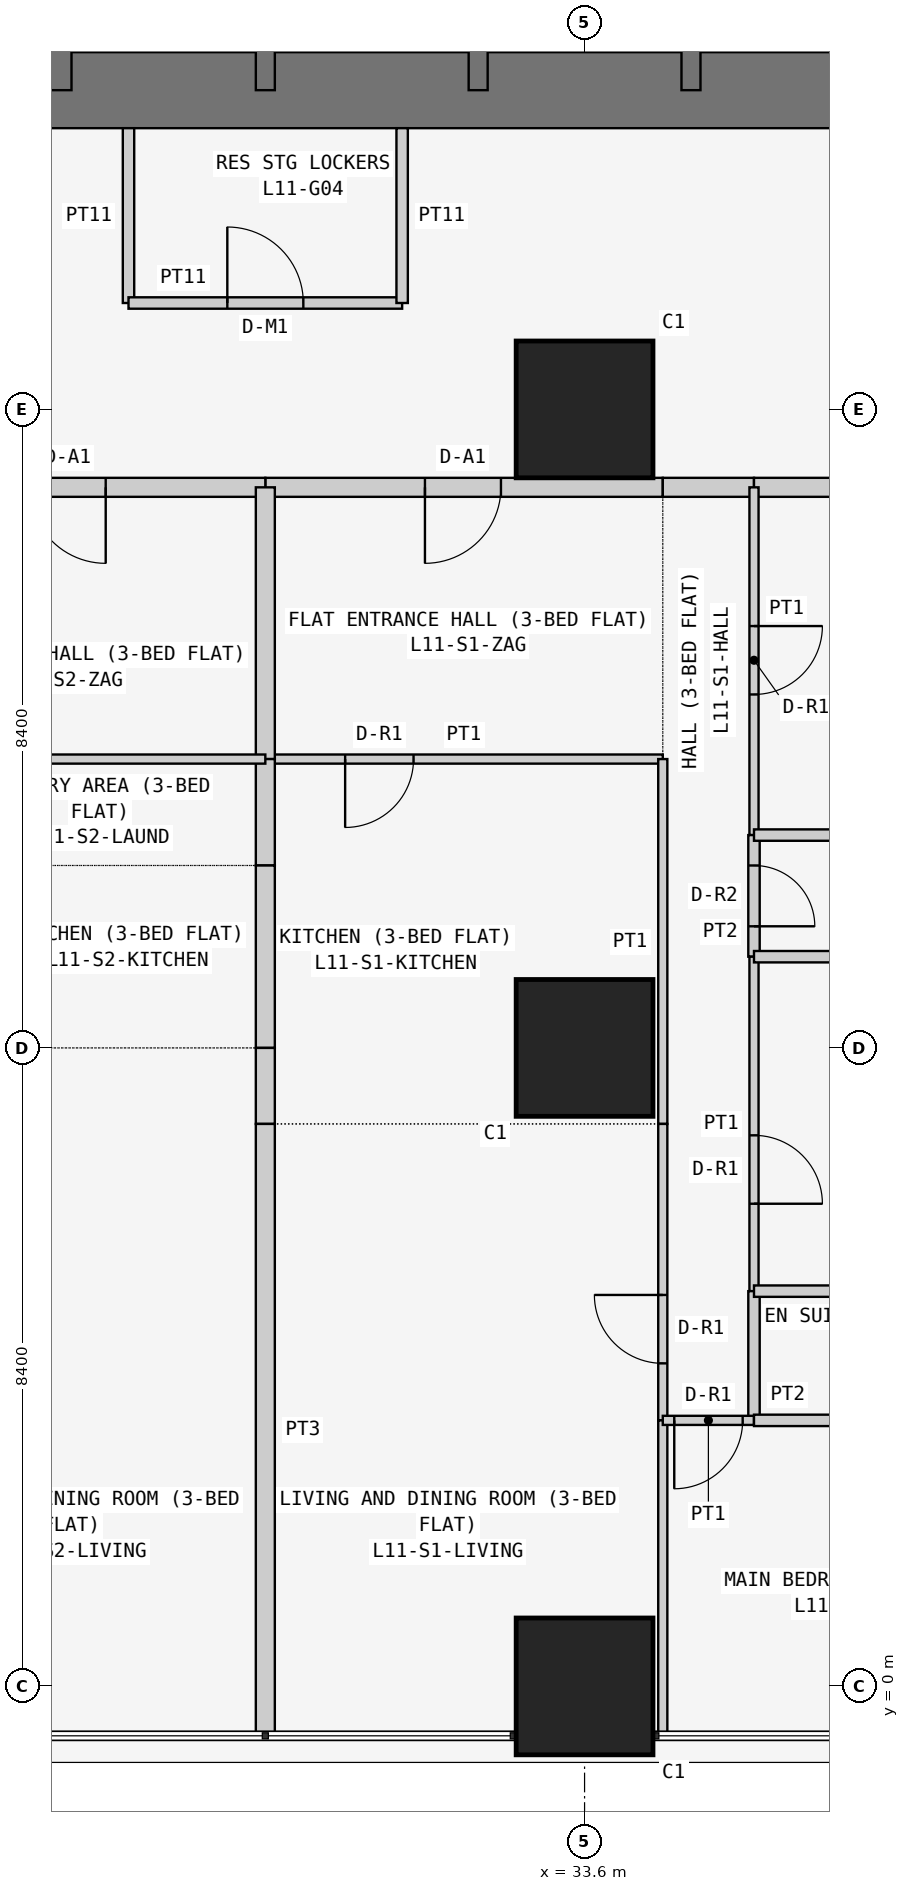
"""IFC4 building model, lengths in metres.
Left out: names, types, materials, properties, quantities, classifications, styles, units other than length and angle.
Written with IfcOpenShell. Run it as: python <this file> out.ifc"""

import sys

from ifc_helpers import new_model, si_unit, direction, frame, frame_2d, origin, origin_2d, place, context, subcontext, project, spatial, rectangle, extrude, element, fill, save


model = new_model("IFC4")
c1 = context("Model", 3, precision=1e-05, world=origin(), true_north=direction((0.0, 1.0)))
c2 = subcontext(c1, "Body", "Model", "MODEL_VIEW")
j1 = project(units=[si_unit("LENGTHUNIT", "METRE"), si_unit("PLANEANGLEUNIT", "RADIAN")], contexts=[c1])
p1 = place(None, origin())
s1 = spatial("IfcSite", under=j1, at=p1, CompositionType="ELEMENT")
p2 = place(p1, origin())
s2 = spatial("IfcBuilding", under=s1, at=p2, CompositionType="ELEMENT")
p3 = place(p2, frame((0.0, 0.0, 48.9)))
s3 = spatial("IfcBuildingStorey", under=s2, at=p3, CompositionType="ELEMENT", Elevation=48.9)
for number, where, z_axis, x_axis in (
    (1, (33.6, 0.0, 0.0), (0.0, 0.0, 1.0), (1.0, 0.0, 0.0)),
    (2, (33.6, 8.4, 0.0), (0.0, 0.0, 1.0), (1.0, 0.0, 0.0)),
    (3, (33.6, 16.8, 0.0), (0.0, 0.0, 1.0), (1.0, 0.0, 0.0)),
):
    element("IfcColumn", number, at=place(p3, frame(where, z_axis=z_axis, x_axis=x_axis)), inside=s3, PredefinedType="COLUMN", context=c2, shape_type="SweptSolid", body=[
        extrude(rectangle(XDim=1.8, YDim=1.8, at=origin_2d()), origin(), (0.0, 0.0, 1.0), 3.6),
    ])
p4 = place(p3, frame((21.0, 21.0, 0.0), z_axis=(0.0, 0.0, 1.0), x_axis=(1.0, 0.0, 0.0)))
e4 = element("IfcWall", 4, at=p4, inside=s3, PredefinedType="SHEAR", context=c2, shape_type="SweptSolid", body=[
    extrude(rectangle(XDim=17.3, YDim=1.0, at=frame_2d((8.65, 0.0))), origin(), (0.0, 0.0, 1.0), 3.6),
])
p5 = place(p3, frame((26.6, 21.0, 0.0), z_axis=(0.0, 0.0, 1.0), x_axis=(0.0, 1.0, 0.0)))
e5 = element("IfcWall", 5, at=p5, inside=s3, PredefinedType="SHEAR", context=c2, shape_type="SweptSolid", body=[
    extrude(rectangle(XDim=16.8, YDim=0.5, at=frame_2d((8.4, 0.0))), origin(), (0.0, 0.0, 1.0), 3.6),
])
p6 = place(p5, frame((10.4, 0.0, 0.0)))
e6 = element("IfcOpeningElement", 6, at=p6, cuts=e5, PredefinedType="OPENING", context=c2, shape_type="SweptSolid", body=[
    extrude(rectangle(XDim=1.2, YDim=2.1, at=frame_2d((0.6, 1.05))), frame((0.0, 0.26, 0.0), z_axis=(0.0, -1.0, 0.0), x_axis=(1.0, 0.0, 0.0)), (0.0, 0.0, 1.0), 0.52),
])
for number, where, z_axis, x_axis in (
    (7, (29.4, 21.0, 0.0), (0.0, 0.0, 1.0), (0.0, 1.0, 0.0)),
    (8, (32.2, 21.0, 0.0), (0.0, 0.0, 1.0), (0.0, 1.0, 0.0)),
    (9, (35.0, 21.0, 0.0), (0.0, 0.0, 1.0), (0.0, 1.0, 0.0)),
):
    element("IfcWall", number, at=place(p3, frame(where, z_axis=z_axis, x_axis=x_axis)), inside=s3, PredefinedType="SHEAR", context=c2, shape_type="SweptSolid", body=[
        extrude(rectangle(XDim=3.2, YDim=0.25, at=frame_2d((1.6, 0.0))), origin(), (0.0, 0.0, 1.0), 3.6),
    ])
p7 = place(p3, frame((27.6, 20.5, 0.0), z_axis=(0.0, 0.0, 1.0), x_axis=(0.0, -1.0, 0.0)))
e10 = element("IfcWall", 10, at=p7, inside=s3, PredefinedType="PARTITIONING", context=c2, shape_type="SweptSolid", body=[
    extrude(rectangle(XDim=2.3, YDim=0.15, at=frame_2d((1.15, 0.0))), origin(), (0.0, 0.0, 1.0), 3.45),
])
p8 = place(p3, frame((27.6, 18.2, 0.0), z_axis=(0.0, 0.0, 1.0), x_axis=(1.0, 0.0, 0.0)))
e11 = element("IfcWall", 11, at=p8, inside=s3, PredefinedType="PARTITIONING", context=c2, shape_type="SweptSolid", body=[
    extrude(rectangle(XDim=3.6, YDim=0.15, at=frame_2d((1.8, 0.0))), origin(), (0.0, 0.0, 1.0), 3.45),
])
p9 = place(p8, frame((1.3, 0.0, 0.0)))
e12 = element("IfcOpeningElement", 12, at=p9, cuts=e11, PredefinedType="OPENING", context=c2, shape_type="SweptSolid", body=[
    extrude(rectangle(XDim=1.0, YDim=2.1, at=frame_2d((0.5, 1.05))), frame((0.0, 0.085, 0.0), z_axis=(0.0, -1.0, 0.0), x_axis=(1.0, 0.0, 0.0)), (0.0, 0.0, 1.0), 0.17),
])
p10 = place(p3, frame((31.2, 18.2, 0.0), z_axis=(0.0, 0.0, 1.0), x_axis=(0.0, 1.0, 0.0)))
e13 = element("IfcWall", 13, at=p10, inside=s3, PredefinedType="PARTITIONING", context=c2, shape_type="SweptSolid", body=[
    extrude(rectangle(XDim=2.3, YDim=0.15, at=frame_2d((1.15, 0.0))), origin(), (0.0, 0.0, 1.0), 3.45),
])
p11 = place(p3, frame((34.629, 15.775, 0.0), z_axis=(0.0, 0.0, 1.0), x_axis=(-1.0, 0.0, 0.0)))
e14 = element("IfcWall", 14, at=p11, inside=s3, PredefinedType="PARTITIONING", context=c2, shape_type="SweptSolid", body=[
    extrude(rectangle(XDim=5.229, YDim=0.25, at=frame_2d((2.615, 0.0))), origin(), (0.0, 0.0, 1.0), 3.45),
])
p12 = place(p11, frame((2.129, 0.0, 0.0)))
e15 = element("IfcOpeningElement", 15, at=p12, cuts=e14, PredefinedType="OPENING", context=c2, shape_type="SweptSolid", body=[
    extrude(rectangle(XDim=1.0, YDim=2.1, at=frame_2d((0.5, 1.05))), frame((0.0, 0.135, 0.0), z_axis=(0.0, -1.0, 0.0), x_axis=(1.0, 0.0, 0.0)), (0.0, 0.0, 1.0), 0.27),
])
p13 = place(p3, frame((35.829, 15.775, 0.0), z_axis=(0.0, 0.0, 1.0), x_axis=(-1.0, 0.0, 0.0)))
e16 = element("IfcWall", 16, at=p13, inside=s3, PredefinedType="PARTITIONING", context=c2, shape_type="SweptSolid", body=[
    extrude(rectangle(XDim=1.2, YDim=0.25, at=frame_2d((0.6, 0.0))), origin(), (0.0, 0.0, 1.0), 3.45),
])
p14 = place(p3, frame((42.7, 15.775, 0.0), z_axis=(0.0, 0.0, 1.0), x_axis=(-1.0, 0.0, 0.0)))
e17 = element("IfcWall", 17, at=p14, inside=s3, PredefinedType="PARTITIONING", context=c2, shape_type="SweptSolid", body=[
    extrude(rectangle(XDim=6.871, YDim=0.25, at=frame_2d((3.436, 0.0))), origin(), (0.0, 0.0, 1.0), 3.45),
])
p15 = place(p3, frame((29.4, 15.775, 0.0), z_axis=(0.0, 0.0, 1.0), x_axis=(-1.0, 0.0, 0.0)))
e18 = element("IfcWall", 18, at=p15, inside=s3, PredefinedType="PARTITIONING", context=c2, shape_type="SweptSolid", body=[
    extrude(rectangle(XDim=5.229, YDim=0.25, at=frame_2d((2.615, 0.0))), origin(), (0.0, 0.0, 1.0), 3.45),
])
p16 = place(p15, frame((2.1, 0.0, 0.0)))
e19 = element("IfcOpeningElement", 19, at=p16, cuts=e18, PredefinedType="OPENING", context=c2, shape_type="SweptSolid", body=[
    extrude(rectangle(XDim=1.0, YDim=2.1, at=frame_2d((0.5, 1.05))), frame((0.0, 0.135, 0.0), z_axis=(0.0, -1.0, 0.0), x_axis=(1.0, 0.0, 0.0)), (0.0, 0.0, 1.0), 0.27),
])
p17 = place(p3, frame((29.4, 12.2, 0.0), z_axis=(0.0, 0.0, 1.0), x_axis=(1.0, 0.0, 0.0)))
e20 = element("IfcWall", 20, at=p17, inside=s3, PredefinedType="PARTITIONING", context=c2, shape_type="SweptSolid", body=[
    extrude(rectangle(XDim=5.229, YDim=0.12, at=frame_2d((2.615, 0.0))), origin(), (0.0, 0.0, 1.0), 3.45),
])
p18 = place(p17, frame((1.05, 0.0, 0.0)))
e21 = element("IfcOpeningElement", 21, at=p18, cuts=e20, PredefinedType="OPENING", context=c2, shape_type="SweptSolid", body=[
    extrude(rectangle(XDim=0.9, YDim=2.1, at=frame_2d((0.45, 1.05))), frame((0.0, 0.07, 0.0), z_axis=(0.0, -1.0, 0.0), x_axis=(1.0, 0.0, 0.0)), (0.0, 0.0, 1.0), 0.14),
])
p19 = place(p3, frame((29.4, 15.775, 0.0), z_axis=(0.0, 0.0, 1.0), x_axis=(0.0, -1.0, 0.0)))
e22 = element("IfcWall", 22, at=p19, inside=s3, PredefinedType="PARTITIONING", context=c2, shape_type="SweptSolid", body=[
    extrude(rectangle(XDim=3.575, YDim=0.25, at=frame_2d((1.788, 0.0))), origin(), (0.0, 0.0, 1.0), 2.848),
])
p20 = place(p3, frame((34.629, 7.4, 0.0), z_axis=(0.0, 0.0, 1.0), x_axis=(0.0, 1.0, 0.0)))
e23 = element("IfcWall", 23, at=p20, inside=s3, PredefinedType="PARTITIONING", context=c2, shape_type="SweptSolid", body=[
    extrude(rectangle(XDim=4.8, YDim=0.12, at=frame_2d((2.4, 0.0))), origin(), (0.0, 0.0, 1.0), 3.45),
])
p21 = place(p3, frame((29.4, 12.2, 0.0), z_axis=(0.0, 0.0, 1.0), x_axis=(0.0, -1.0, 0.0)))
e24 = element("IfcWall", 24, at=p21, inside=s3, PredefinedType="PARTITIONING", context=c2, shape_type="SweptSolid", body=[
    extrude(rectangle(XDim=1.4, YDim=0.25, at=frame_2d((0.7, 0.0))), origin(), (0.0, 0.0, 1.0), 2.848),
])
p22 = place(p3, frame((29.4, 10.8, 0.0), z_axis=(0.0, 0.0, 1.0), x_axis=(0.0, -1.0, 0.0)))
e25 = element("IfcWall", 25, at=p22, inside=s3, PredefinedType="PARTITIONING", context=c2, shape_type="SweptSolid", body=[
    extrude(rectangle(XDim=2.4, YDim=0.25, at=frame_2d((1.2, 0.0))), origin(), (0.0, 0.0, 1.0), 2.848),
])
p23 = place(p3, frame((29.4, 8.4, 0.0), z_axis=(0.0, 0.0, 1.0), x_axis=(0.0, -1.0, 0.0)))
e26 = element("IfcWall", 26, at=p23, inside=s3, PredefinedType="PARTITIONING", context=c2, shape_type="SweptSolid", body=[
    extrude(rectangle(XDim=1.0, YDim=0.25, at=frame_2d((0.5, 0.0))), origin(), (0.0, 0.0, 1.0), 2.848),
])
p24 = place(p3, frame((34.629, 3.5, 0.0), z_axis=(0.0, 0.0, 1.0), x_axis=(0.0, 1.0, 0.0)))
e27 = element("IfcWall", 27, at=p24, inside=s3, PredefinedType="PARTITIONING", context=c2, shape_type="SweptSolid", body=[
    extrude(rectangle(XDim=3.9, YDim=0.12, at=frame_2d((1.95, 0.0))), origin(), (0.0, 0.0, 1.0), 3.45),
])
p25 = place(p24, frame((0.75, 0.0, 0.0)))
e28 = element("IfcOpeningElement", 28, at=p25, cuts=e27, PredefinedType="OPENING", context=c2, shape_type="SweptSolid", body=[
    extrude(rectangle(XDim=0.9, YDim=2.1, at=frame_2d((0.45, 1.05))), frame((0.0, 0.07, 0.0), z_axis=(0.0, -1.0, 0.0), x_axis=(1.0, 0.0, 0.0)), (0.0, 0.0, 1.0), 0.14),
])
p26 = place(p3, frame((34.629, -0.65, 0.0), z_axis=(0.0, 0.0, 1.0), x_axis=(0.0, 1.0, 0.0)))
e29 = element("IfcWall", 29, at=p26, inside=s3, PredefinedType="PARTITIONING", context=c2, shape_type="SweptSolid", body=[
    extrude(rectangle(XDim=4.15, YDim=0.12, at=frame_2d((2.075, 0.0))), origin(), (0.0, 0.0, 1.0), 3.45),
])
p27 = place(p3, frame((29.4, 7.4, 0.0), z_axis=(0.0, 0.0, 1.0), x_axis=(0.0, -1.0, 0.0)))
e30 = element("IfcWall", 30, at=p27, inside=s3, PredefinedType="PARTITIONING", context=c2, shape_type="SweptSolid", body=[
    extrude(rectangle(XDim=8.05, YDim=0.25, at=frame_2d((4.025, 0.0))), origin(), (0.0, 0.0, 1.0), 2.848),
])
p28 = place(p3, frame((35.829, 11.2, 0.0), z_axis=(0.0, 0.0, 1.0), x_axis=(0.0, 1.0, 0.0)))
e31 = element("IfcWall", 31, at=p28, inside=s3, PredefinedType="PARTITIONING", context=c2, shape_type="SweptSolid", body=[
    extrude(rectangle(XDim=4.575, YDim=0.12, at=frame_2d((2.288, 0.0))), origin(), (0.0, 0.0, 1.0), 3.45),
])
p29 = place(p28, frame((1.85, 0.0, 0.0)))
e32 = element("IfcOpeningElement", 32, at=p29, cuts=e31, PredefinedType="OPENING", context=c2, shape_type="SweptSolid", body=[
    extrude(rectangle(XDim=0.9, YDim=2.1, at=frame_2d((0.45, 1.05))), frame((0.0, 0.07, 0.0), z_axis=(0.0, -1.0, 0.0), x_axis=(1.0, 0.0, 0.0)), (0.0, 0.0, 1.0), 0.14),
])
p30 = place(p3, frame((35.829, 9.6, 0.0), z_axis=(0.0, 0.0, 1.0), x_axis=(0.0, 1.0, 0.0)))
e33 = element("IfcWall", 33, at=p30, inside=s3, PredefinedType="PARTITIONING", context=c2, shape_type="SweptSolid", body=[
    extrude(rectangle(XDim=1.6, YDim=0.15, at=frame_2d((0.8, 0.0))), origin(), (0.0, 0.0, 1.0), 3.45),
])
p31 = place(p30, frame((0.4, 0.0, 0.0)))
e34 = element("IfcOpeningElement", 34, at=p31, cuts=e33, PredefinedType="OPENING", context=c2, shape_type="SweptSolid", body=[
    extrude(rectangle(XDim=0.8, YDim=2.1, at=frame_2d((0.4, 1.05))), frame((0.0, 0.085, 0.0), z_axis=(0.0, -1.0, 0.0), x_axis=(1.0, 0.0, 0.0)), (0.0, 0.0, 1.0), 0.17),
])
p32 = place(p3, frame((35.829, 5.2, 0.0), z_axis=(0.0, 0.0, 1.0), x_axis=(0.0, 1.0, 0.0)))
e35 = element("IfcWall", 35, at=p32, inside=s3, PredefinedType="PARTITIONING", context=c2, shape_type="SweptSolid", body=[
    extrude(rectangle(XDim=4.4, YDim=0.12, at=frame_2d((2.2, 0.0))), origin(), (0.0, 0.0, 1.0), 3.45),
])
p33 = place(p32, frame((1.15, 0.0, 0.0)))
e36 = element("IfcOpeningElement", 36, at=p33, cuts=e35, PredefinedType="OPENING", context=c2, shape_type="SweptSolid", body=[
    extrude(rectangle(XDim=0.9, YDim=2.1, at=frame_2d((0.45, 1.05))), frame((0.0, 0.07, 0.0), z_axis=(0.0, -1.0, 0.0), x_axis=(1.0, 0.0, 0.0)), (0.0, 0.0, 1.0), 0.14),
])
p34 = place(p3, frame((35.829, 3.5, 0.0), z_axis=(0.0, 0.0, 1.0), x_axis=(0.0, 1.0, 0.0)))
e37 = element("IfcWall", 37, at=p34, inside=s3, PredefinedType="PARTITIONING", context=c2, shape_type="SweptSolid", body=[
    extrude(rectangle(XDim=1.7, YDim=0.15, at=frame_2d((0.85, 0.0))), origin(), (0.0, 0.0, 1.0), 3.45),
])
p35 = place(p3, frame((34.629, 3.5, 0.0), z_axis=(0.0, 0.0, 1.0), x_axis=(1.0, 0.0, 0.0)))
e38 = element("IfcWall", 38, at=p35, inside=s3, PredefinedType="PARTITIONING", context=c2, shape_type="SweptSolid", body=[
    extrude(rectangle(XDim=1.2, YDim=0.12, at=frame_2d((0.6, 0.0))), origin(), (0.0, 0.0, 1.0), 3.45),
])
p36 = place(p35, frame((0.151, 0.0, 0.0)))
e39 = element("IfcOpeningElement", 39, at=p36, cuts=e38, PredefinedType="OPENING", context=c2, shape_type="SweptSolid", body=[
    extrude(rectangle(XDim=0.9, YDim=2.1, at=frame_2d((0.45, 1.05))), frame((0.0, 0.07, 0.0), z_axis=(0.0, -1.0, 0.0), x_axis=(1.0, 0.0, 0.0)), (0.0, 0.0, 1.0), 0.14),
])
for number, where, z_axis, x_axis in (
    (40, (35.829, 11.2, 0.0), (0.0, 0.0, 1.0), (1.0, 0.0, 0.0)),
    (41, (35.829, 9.6, 0.0), (0.0, 0.0, 1.0), (1.0, 0.0, 0.0)),
    (42, (35.829, 5.2, 0.0), (0.0, 0.0, 1.0), (1.0, 0.0, 0.0)),
):
    element("IfcWall", number, at=place(p3, frame(where, z_axis=z_axis, x_axis=x_axis)), inside=s3, PredefinedType="PARTITIONING", context=c2, shape_type="SweptSolid", body=[
        extrude(rectangle(XDim=6.871, YDim=0.15, at=frame_2d((3.436, 0.0))), origin(), (0.0, 0.0, 1.0), 3.45),
    ])
p37 = place(p3, frame((35.829, 3.5, 0.0), z_axis=(0.0, 0.0, 1.0), x_axis=(1.0, 0.0, 0.0)))
e43 = element("IfcWall", 43, at=p37, inside=s3, PredefinedType="PARTITIONING", context=c2, shape_type="SweptSolid", body=[
    extrude(rectangle(XDim=6.871, YDim=0.15, at=frame_2d((3.436, 0.0))), origin(), (0.0, 0.0, 1.0), 3.45),
])
p38 = place(p37, frame((3.171, 0.0, 0.0)))
e44 = element("IfcOpeningElement", 44, at=p38, cuts=e43, PredefinedType="OPENING", context=c2, shape_type="SweptSolid", body=[
    extrude(rectangle(XDim=0.8, YDim=2.1, at=frame_2d((0.4, 1.05))), frame((0.0, 0.085, 0.0), z_axis=(0.0, -1.0, 0.0), x_axis=(1.0, 0.0, 0.0)), (0.0, 0.0, 1.0), 0.17),
])
p39 = place(p3, frame((29.4, 12.2, 0.0), z_axis=(0.0, 0.0, 1.0), x_axis=(-1.0, 0.0, 0.0)))
e45 = element("IfcWall", 45, at=p39, inside=s3, PredefinedType="PARTITIONING", context=c2, shape_type="SweptSolid", body=[
    extrude(rectangle(XDim=5.229, YDim=0.12, at=frame_2d((2.615, 0.0))), origin(), (0.0, 0.0, 1.0), 3.45),
])
p40 = place(p9, origin())
e46 = element("IfcDoor", 46, at=p40, inside=s3, OperationType="SINGLE_SWING_LEFT", PredefinedType="DOOR", context=c2, shape_type="SweptSolid", body=[
    extrude(rectangle(XDim=1.0, YDim=2.1, at=frame_2d((0.5, 1.05))), frame((0.0, 0.025, 0.0), z_axis=(0.0, -1.0, 0.0), x_axis=(1.0, 0.0, 0.0)), (0.0, 0.0, 1.0), 0.05),
])
fill(e12, e46)
p41 = place(p12, origin())
e47 = element("IfcDoor", 47, at=p41, inside=s3, OperationType="SINGLE_SWING_RIGHT", PredefinedType="DOOR", context=c2, shape_type="SweptSolid", body=[
    extrude(rectangle(XDim=1.0, YDim=2.1, at=frame_2d((0.5, 1.05))), frame((0.0, 0.025, 0.0), z_axis=(0.0, -1.0, 0.0), x_axis=(1.0, 0.0, 0.0)), (0.0, 0.0, 1.0), 0.05),
])
fill(e15, e47)
p42 = place(p18, frame((0.9, 0.0, 0.0), z_axis=(0.0, 0.0, 1.0), x_axis=(-1.0, 0.0, 0.0)))
e48 = element("IfcDoor", 48, at=p42, inside=s3, OperationType="SINGLE_SWING_RIGHT", PredefinedType="DOOR", context=c2, shape_type="SweptSolid", body=[
    extrude(rectangle(XDim=0.9, YDim=2.1, at=frame_2d((0.45, 1.05))), frame((0.0, 0.025, 0.0), z_axis=(0.0, -1.0, 0.0), x_axis=(1.0, 0.0, 0.0)), (0.0, 0.0, 1.0), 0.05),
])
fill(e21, e48)
p43 = place(p25, origin())
e49 = element("IfcDoor", 49, at=p43, inside=s3, OperationType="SINGLE_SWING_RIGHT", PredefinedType="DOOR", context=c2, shape_type="SweptSolid", body=[
    extrude(rectangle(XDim=0.9, YDim=2.1, at=frame_2d((0.45, 1.05))), frame((0.0, 0.025, 0.0), z_axis=(0.0, -1.0, 0.0), x_axis=(1.0, 0.0, 0.0)), (0.0, 0.0, 1.0), 0.05),
])
fill(e28, e49)
p44 = place(p29, frame((0.9, 0.0, 0.0), z_axis=(0.0, 0.0, 1.0), x_axis=(-1.0, 0.0, 0.0)))
e50 = element("IfcDoor", 50, at=p44, inside=s3, OperationType="SINGLE_SWING_LEFT", PredefinedType="DOOR", context=c2, shape_type="SweptSolid", body=[
    extrude(rectangle(XDim=0.9, YDim=2.1, at=frame_2d((0.45, 1.05))), frame((0.0, 0.025, 0.0), z_axis=(0.0, -1.0, 0.0), x_axis=(1.0, 0.0, 0.0)), (0.0, 0.0, 1.0), 0.05),
])
fill(e32, e50)
p45 = place(p31, frame((0.8, 0.0, 0.0), z_axis=(0.0, 0.0, 1.0), x_axis=(-1.0, 0.0, 0.0)))
e51 = element("IfcDoor", 51, at=p45, inside=s3, OperationType="SINGLE_SWING_RIGHT", PredefinedType="DOOR", context=c2, shape_type="SweptSolid", body=[
    extrude(rectangle(XDim=0.8, YDim=2.1, at=frame_2d((0.4, 1.05))), frame((0.0, 0.025, 0.0), z_axis=(0.0, -1.0, 0.0), x_axis=(1.0, 0.0, 0.0)), (0.0, 0.0, 1.0), 0.05),
])
fill(e34, e51)
p46 = place(p33, frame((0.9, 0.0, 0.0), z_axis=(0.0, 0.0, 1.0), x_axis=(-1.0, 0.0, 0.0)))
e52 = element("IfcDoor", 52, at=p46, inside=s3, OperationType="SINGLE_SWING_RIGHT", PredefinedType="DOOR", context=c2, shape_type="SweptSolid", body=[
    extrude(rectangle(XDim=0.9, YDim=2.1, at=frame_2d((0.45, 1.05))), frame((0.0, 0.025, 0.0), z_axis=(0.0, -1.0, 0.0), x_axis=(1.0, 0.0, 0.0)), (0.0, 0.0, 1.0), 0.05),
])
fill(e36, e52)
p47 = place(p36, frame((0.9, 0.0, 0.0), z_axis=(0.0, 0.0, 1.0), x_axis=(-1.0, 0.0, 0.0)))
e53 = element("IfcDoor", 53, at=p47, inside=s3, OperationType="SINGLE_SWING_RIGHT", PredefinedType="DOOR", context=c2, shape_type="SweptSolid", body=[
    extrude(rectangle(XDim=0.9, YDim=2.1, at=frame_2d((0.45, 1.05))), frame((0.0, 0.025, 0.0), z_axis=(0.0, -1.0, 0.0), x_axis=(1.0, 0.0, 0.0)), (0.0, 0.0, 1.0), 0.05),
])
fill(e39, e53)
p48 = place(p16, origin())
e54 = element("IfcDoor", 54, at=p48, inside=s3, OperationType="SINGLE_SWING_LEFT", PredefinedType="DOOR", context=c2, shape_type="SweptSolid", body=[
    extrude(rectangle(XDim=1.0, YDim=2.1, at=frame_2d((0.5, 1.05))), frame((0.0, 0.025, 0.0), z_axis=(0.0, -1.0, 0.0), x_axis=(1.0, 0.0, 0.0)), (0.0, 0.0, 1.0), 0.05),
])
fill(e19, e54)
save(model, sys.argv[1])
